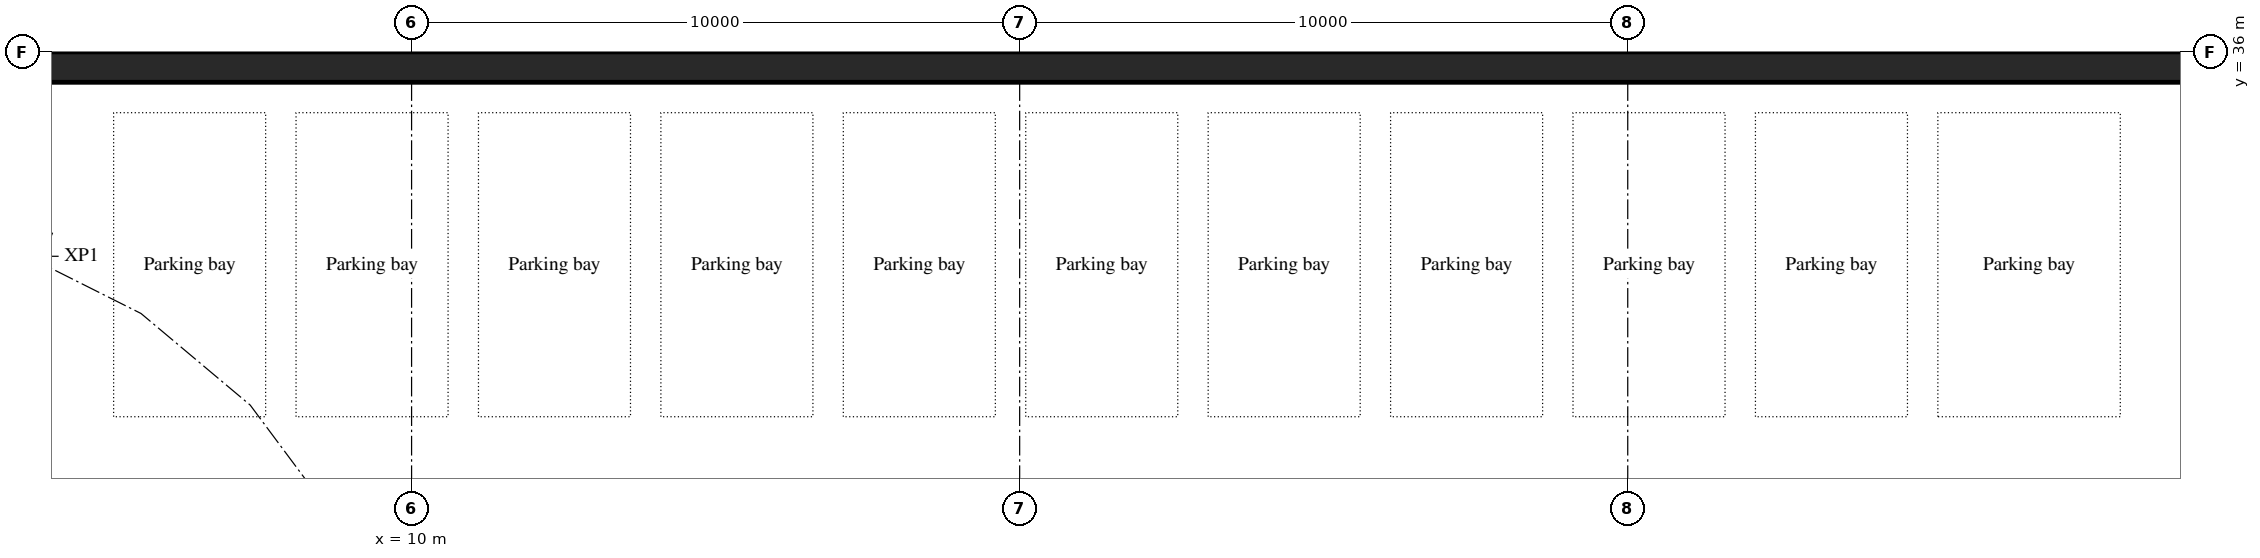
"""IFC4 building model, lengths in metres.
Left out: names, types, materials, properties, quantities, classifications, styles, units other than length and angle.
Written with IfcOpenShell. Run it as: python <this file> out.ifc"""

import sys

from ifc_helpers import new_model, si_unit, direction, frame, frame_2d, origin, place, context, subcontext, project, spatial, rectangle, extrude, element, save


model = new_model("IFC4")
c1 = context("Model", 3, precision=1e-05, world=origin(), true_north=direction((0.0, 1.0)))
c2 = subcontext(c1, "Body", "Model", "MODEL_VIEW")
j1 = project(units=[si_unit("LENGTHUNIT", "METRE"), si_unit("PLANEANGLEUNIT", "RADIAN")], contexts=[c1])
p1 = place(None, origin())
s1 = spatial("IfcSite", under=j1, at=p1, CompositionType="ELEMENT")
p2 = place(p1, origin())
s2 = spatial("IfcBuilding", under=s1, at=p2, CompositionType="ELEMENT")
p3 = place(p2, frame((0.0, 0.0, -4.2)))
s3 = spatial("IfcBuildingStorey", under=s2, at=p3, CompositionType="ELEMENT", Elevation=-4.2)
p4 = place(p3, frame((40.0, 35.75, -0.38), z_axis=(0.0, 0.0, 1.0), x_axis=(-1.0, 0.0, 0.0)))
e1 = element("IfcWall", 1, at=p4, inside=s3, PredefinedType="SOLIDWALL", context=c2, shape_type="SweptSolid", body=[
    extrude(rectangle(XDim=80.0, YDim=0.5, at=frame_2d((40.0, 0.0))), origin(), (0.0, 0.0, 1.0), 3.88),
])
save(model, sys.argv[1])
